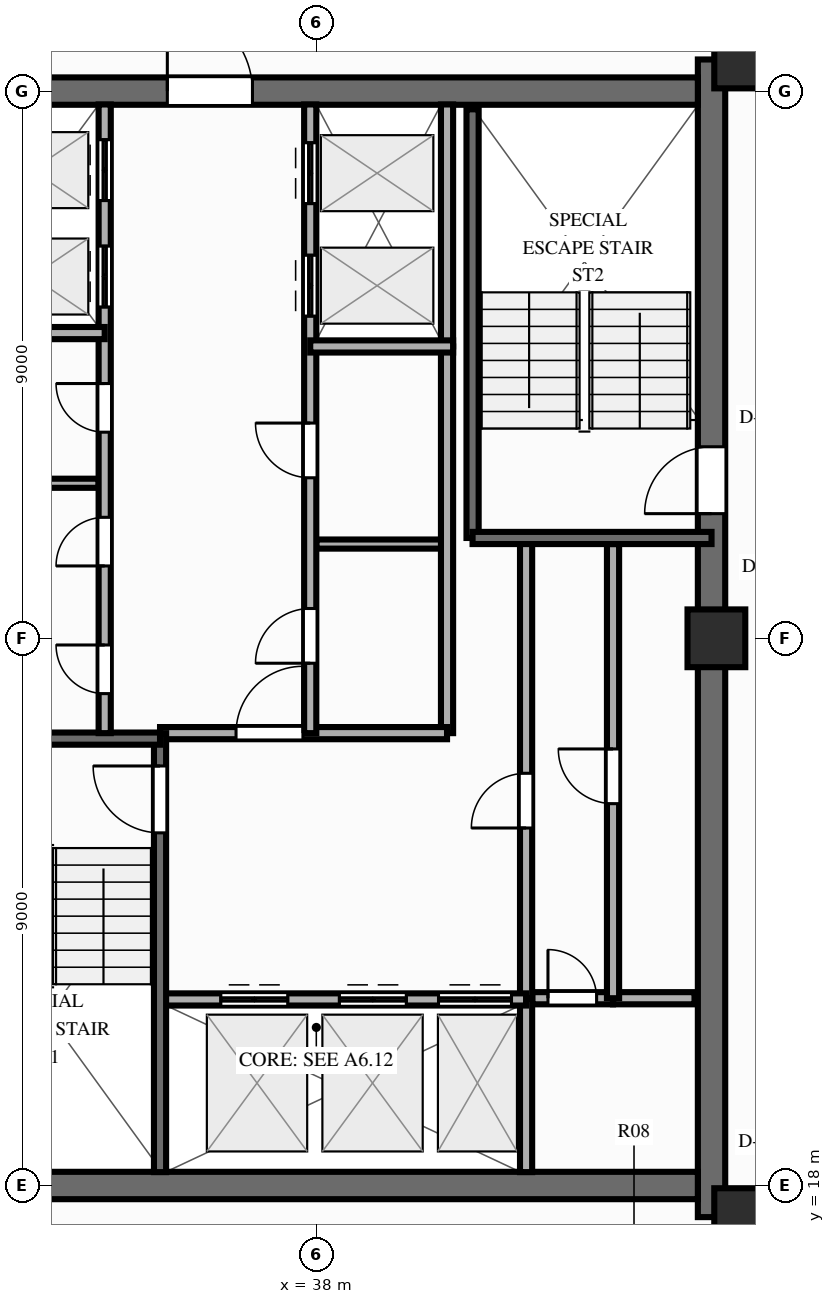
"""IFC4 building model, lengths in metres.
Left out: names, types, materials, properties, quantities, classifications, styles, units other than length and angle.
Written with IfcOpenShell. Run it as: python <this file> out.ifc"""

import sys

from ifc_helpers import new_model, si_unit, direction, frame, frame_2d, origin, origin_2d, place, context, subcontext, project, spatial, rectangle, extrude, source, transform, mapped, element, fill, save


model = new_model("IFC4")
c1 = context("Model", 3, precision=1e-05, world=origin(), true_north=direction((0.0, 1.0)))
c2 = subcontext(c1, "Body", "Model", "MODEL_VIEW")
j1 = project(units=[si_unit("LENGTHUNIT", "METRE"), si_unit("PLANEANGLEUNIT", "RADIAN")], contexts=[c1])
p1 = place(None, origin())
s1 = spatial("IfcSite", under=j1, at=p1, CompositionType="ELEMENT")
p2 = place(p1, origin())
s2 = spatial("IfcBuilding", under=s1, at=p2, CompositionType="ELEMENT")
p3 = place(p2, frame((0.0, 0.0, 246.0)))
s3 = spatial("IfcBuildingStorey", under=s2, at=p3, CompositionType="ELEMENT", Elevation=246.0)
p4 = place(p3, frame((44.5, 17.48, 0.0), z_axis=(0.0, 0.0, 1.0), x_axis=(0.0, 1.0, 0.0)))
e1 = element("IfcWall", 1, at=p4, inside=s3, PredefinedType="SHEAR", context=c2, shape_type="SweptSolid", body=[
    extrude(rectangle(XDim=19.04, YDim=0.45, at=frame_2d((9.52, 0.0))), origin(), (0.0, 0.0, 1.0), 3.0),
])
p5 = place(p4, frame((12.67, 0.0, 0.0), z_axis=(0.0, 0.0, 1.0), x_axis=(-1.0, 0.0, 0.0)))
e2 = element("IfcOpeningElement", 2, at=p5, cuts=e1, PredefinedType="OPENING", context=c2, shape_type="SweptSolid", body=[
    extrude(rectangle(XDim=1.1, YDim=2.15, at=frame_2d((0.55, 1.075))), frame((0.0, 0.237, 0.0), z_axis=(0.0, -1.0, 0.0), x_axis=(1.0, 0.0, 0.0)), (0.0, 0.0, 1.0), 0.474),
])
p6 = place(p3, frame((31.725, 18.0, 0.0), z_axis=(0.0, 0.0, 1.0), x_axis=(1.0, 0.0, 0.0)))
e3 = element("IfcWall", 3, at=p6, inside=s3, PredefinedType="SHEAR", context=c2, shape_type="SweptSolid", body=[
    extrude(rectangle(XDim=12.55, YDim=0.45, at=frame_2d((6.275, 0.0))), origin(), (0.0, 0.0, 1.0), 3.0),
])
p7 = place(p3, frame((31.725, 36.0, 0.0), z_axis=(0.0, 0.0, 1.0), x_axis=(1.0, 0.0, 0.0)))
e4 = element("IfcWall", 4, at=p7, inside=s3, PredefinedType="SHEAR", context=c2, shape_type="SweptSolid", body=[
    extrude(rectangle(XDim=12.55, YDim=0.45, at=frame_2d((6.275, 0.0))), origin(), (0.0, 0.0, 1.0), 3.0),
])
p8 = place(p7, frame((5.225, 0.0, 0.0), z_axis=(0.0, 0.0, 1.0), x_axis=(-1.0, 0.0, 0.0)))
e5 = element("IfcOpeningElement", 5, at=p8, cuts=e4, PredefinedType="OPENING", context=c2, shape_type="SweptSolid", body=[
    extrude(rectangle(XDim=1.4, YDim=2.15, at=frame_2d((0.7, 1.075))), frame((0.0, 0.237, 0.0), z_axis=(0.0, -1.0, 0.0), x_axis=(1.0, 0.0, 0.0)), (0.0, 0.0, 1.0), 0.474),
])
m1 = source(origin(), c2, "Body", "SweptSolid", [
    extrude(rectangle(XDim=0.95, YDim=0.95, at=origin_2d()), origin(), (0.0, 0.0, 1.0), 3.0),
])
for number, where, z_axis, x_axis in (
    (6, (45.02, 17.48, 0.0), (0.0, 0.0, 1.0), (1.0, 0.0, 0.0)),
    (7, (45.02, 36.52, 0.0), (0.0, 0.0, 1.0), (1.0, 0.0, 0.0)),
    (8, (44.58, 27.0, 0.0), (0.0, 0.0, 1.0), (1.0, 0.0, 0.0)),
):
    element("IfcColumn", number, at=place(p3, frame(where, z_axis=z_axis, x_axis=x_axis)), inside=s3, PredefinedType="COLUMN", context=c2, shape_type="MappedRepresentation", body=[
        mapped(m1, transform((0.0, 0.0, 0.0), scale=1.0)),
    ])
p9 = place(p3, frame((32.15, 29.55, 0.0), z_axis=(0.0, 0.0, 1.0), x_axis=(1.0, 0.0, 0.0)))
e9 = element("IfcWall", 9, at=p9, inside=s3, PredefinedType="PARTITIONING", context=c2, shape_type="SweptSolid", body=[
    extrude(rectangle(XDim=2.27, YDim=0.15, at=frame_2d((1.135, 0.0))), origin(), (0.0, 0.0, 1.0), 2.74),
])
p10 = place(p3, frame((38.0, 28.55, 0.0), z_axis=(0.0, 0.0, 1.0), x_axis=(1.0, 0.0, 0.0)))
e10 = element("IfcWall", 10, at=p10, inside=s3, PredefinedType="PARTITIONING", context=c2, shape_type="SweptSolid", body=[
    extrude(rectangle(XDim=2.2, YDim=0.15, at=frame_2d((1.1, 0.0))), origin(), (0.0, 0.0, 1.0), 2.14),
])
p11 = place(p3, frame((41.55, 21.08, 0.0), z_axis=(0.0, 0.0, 1.0), x_axis=(1.0, 0.0, 0.0)))
e11 = element("IfcWall", 11, at=p11, inside=s3, PredefinedType="PARTITIONING", context=c2, shape_type="SweptSolid", body=[
    extrude(rectangle(XDim=1.33, YDim=0.2, at=frame_2d((0.665, 0.0))), origin(), (0.0, 0.0, 1.0), 2.74),
])
p12 = place(p11, frame((0.26, 0.0, 0.0)))
e12 = element("IfcOpeningElement", 12, at=p12, cuts=e11, PredefinedType="OPENING", context=c2, shape_type="SweptSolid", body=[
    extrude(rectangle(XDim=0.8, YDim=2.05, at=frame_2d((0.4, 1.025))), frame((0.0, 0.112, 0.0), z_axis=(0.0, -1.0, 0.0), x_axis=(1.0, 0.0, 0.0)), (0.0, 0.0, 1.0), 0.224),
])
p13 = place(p3, frame((42.88, 21.08, 0.0), z_axis=(0.0, 0.0, 1.0), x_axis=(1.0, 0.0, 0.0)))
e13 = element("IfcWall", 13, at=p13, inside=s3, PredefinedType="PARTITIONING", context=c2, shape_type="SweptSolid", body=[
    extrude(rectangle(XDim=1.34, YDim=0.2, at=frame_2d((0.67, 0.0))), origin(), (0.0, 0.0, 1.0), 2.74),
])
p14 = place(p3, frame((42.88, 21.08, 0.0), z_axis=(0.0, 0.0, 1.0), x_axis=(0.0, 1.0, 0.0)))
e14 = element("IfcWall", 14, at=p14, inside=s3, PredefinedType="PARTITIONING", context=c2, shape_type="SweptSolid", body=[
    extrude(rectangle(XDim=7.47, YDim=0.2, at=frame_2d((3.735, 0.0))), origin(), (0.0, 0.0, 1.0), 2.74),
])
p15 = place(p14, frame((3.2, 0.0, 0.0)))
e15 = element("IfcOpeningElement", 15, at=p15, cuts=e14, PredefinedType="OPENING", context=c2, shape_type="SweptSolid", body=[
    extrude(rectangle(XDim=0.9, YDim=2.1, at=frame_2d((0.45, 1.05))), frame((0.0, 0.112, 0.0), z_axis=(0.0, -1.0, 0.0), x_axis=(1.0, 0.0, 0.0)), (0.0, 0.0, 1.0), 0.224),
])
p16 = place(p3, frame((41.45, 18.22, 0.0), z_axis=(0.0, 0.0, 1.0), x_axis=(0.0, 1.0, 0.0)))
e16 = element("IfcWall", 16, at=p16, inside=s3, PredefinedType="PARTITIONING", context=c2, shape_type="SweptSolid", body=[
    extrude(rectangle(XDim=2.86, YDim=0.2, at=frame_2d((1.43, 0.0))), origin(), (0.0, 0.0, 1.0), 2.74),
])
p17 = place(p3, frame((41.45, 21.08, 0.0), z_axis=(0.0, 0.0, 1.0), x_axis=(0.0, 1.0, 0.0)))
e17 = element("IfcWall", 17, at=p17, inside=s3, PredefinedType="PARTITIONING", context=c2, shape_type="SweptSolid", body=[
    extrude(rectangle(XDim=7.52, YDim=0.2, at=frame_2d((3.76, 0.0))), origin(), (0.0, 0.0, 1.0), 2.74),
])
p18 = place(p17, frame((2.8, 0.0, 0.0)))
e18 = element("IfcOpeningElement", 18, at=p18, cuts=e17, PredefinedType="OPENING", context=c2, shape_type="SweptSolid", body=[
    extrude(rectangle(XDim=0.9, YDim=2.1, at=frame_2d((0.45, 1.05))), frame((0.0, 0.112, 0.0), z_axis=(0.0, -1.0, 0.0), x_axis=(1.0, 0.0, 0.0)), (0.0, 0.0, 1.0), 0.224),
])
p19 = place(p3, frame((40.15, 25.44, 0.0), z_axis=(0.0, 0.0, 1.0), x_axis=(0.0, 1.0, 0.0)))
e19 = element("IfcWall", 19, at=p19, inside=s3, PredefinedType="PARTITIONING", context=c2, shape_type="SweptSolid", body=[
    extrude(rectangle(XDim=6.36, YDim=0.2, at=frame_2d((3.18, 0.0))), origin(), (0.0, 0.0, 1.0), 2.74),
])
p20 = place(p3, frame((40.15, 31.8, 0.0), z_axis=(0.0, 0.0, 1.0), x_axis=(0.0, 1.0, 0.0)))
e20 = element("IfcWall", 20, at=p20, inside=s3, PredefinedType="PARTITIONING", context=c2, shape_type="SweptSolid", body=[
    extrude(rectangle(XDim=3.98, YDim=0.2, at=frame_2d((1.99, 0.0))), origin(), (0.0, 0.0, 1.0), 2.74),
])
p21 = place(p3, frame((35.43, 21.06, 0.0), z_axis=(0.0, 0.0, 1.0), x_axis=(1.0, 0.0, 0.0)))
e21 = element("IfcWall", 21, at=p21, inside=s3, PredefinedType="PARTITIONING", context=c2, shape_type="SweptSolid", body=[
    extrude(rectangle(XDim=6.02, YDim=0.2, at=frame_2d((3.01, 0.0))), origin(), (0.0, 0.0, 1.0), 2.74),
])
p22 = place(p21, frame((1.0, 0.0, 0.0)))
e22 = element("IfcOpeningElement", 22, at=p22, cuts=e21, PredefinedType="OPENING", context=c2, shape_type="SweptSolid", body=[
    extrude(rectangle(XDim=1.1, YDim=2.15, at=frame_2d((0.55, 1.075))), frame((0.0, 0.112, 0.0), z_axis=(0.0, -1.0, 0.0), x_axis=(1.0, 0.0, 0.0)), (0.0, 0.0, 1.0), 0.224),
])
p23 = place(p21, frame((2.95, 0.0, 0.0)))
e23 = element("IfcOpeningElement", 23, at=p23, cuts=e21, PredefinedType="OPENING", context=c2, shape_type="SweptSolid", body=[
    extrude(rectangle(XDim=1.1, YDim=2.15, at=frame_2d((0.55, 1.075))), frame((0.0, 0.112, 0.0), z_axis=(0.0, -1.0, 0.0), x_axis=(1.0, 0.0, 0.0)), (0.0, 0.0, 1.0), 0.224),
])
p24 = place(p21, frame((4.58, 0.0, 0.0)))
e24 = element("IfcOpeningElement", 24, at=p24, cuts=e21, PredefinedType="OPENING", context=c2, shape_type="SweptSolid", body=[
    extrude(rectangle(XDim=1.2, YDim=2.15, at=frame_2d((0.6, 1.075))), frame((0.0, 0.112, 0.0), z_axis=(0.0, -1.0, 0.0), x_axis=(1.0, 0.0, 0.0)), (0.0, 0.0, 1.0), 0.224),
])
p25 = place(p3, frame((35.43, 25.44, 0.0), z_axis=(0.0, 0.0, 1.0), x_axis=(1.0, 0.0, 0.0)))
e25 = element("IfcWall", 25, at=p25, inside=s3, PredefinedType="PARTITIONING", context=c2, shape_type="SweptSolid", body=[
    extrude(rectangle(XDim=4.72, YDim=0.2, at=frame_2d((2.36, 0.0))), origin(), (0.0, 0.0, 1.0), 2.74),
])
p26 = place(p25, frame((1.25, 0.0, 0.0)))
e26 = element("IfcOpeningElement", 26, at=p26, cuts=e25, PredefinedType="OPENING", context=c2, shape_type="SweptSolid", body=[
    extrude(rectangle(XDim=1.1, YDim=2.15, at=frame_2d((0.55, 1.075))), frame((0.0, 0.112, 0.0), z_axis=(0.0, -1.0, 0.0), x_axis=(1.0, 0.0, 0.0)), (0.0, 0.0, 1.0), 0.224),
])
p27 = place(p3, frame((35.43, 18.22, 0.0), z_axis=(0.0, 0.0, 1.0), x_axis=(0.0, 1.0, 0.0)))
e27 = element("IfcWall", 27, at=p27, inside=s3, PredefinedType="SOLIDWALL", context=c2, shape_type="SweptSolid", body=[
    extrude(rectangle(XDim=7.22, YDim=0.2, at=frame_2d((3.61, 0.0))), origin(), (0.0, 0.0, 1.0), 2.74),
])
p28 = place(p27, frame((6.68, 0.0, 0.0), z_axis=(0.0, 0.0, 1.0), x_axis=(-1.0, 0.0, 0.0)))
e28 = element("IfcOpeningElement", 28, at=p28, cuts=e27, PredefinedType="OPENING", context=c2, shape_type="SweptSolid", body=[
    extrude(rectangle(XDim=1.1, YDim=2.15, at=frame_2d((0.55, 1.075))), frame((0.0, 0.112, 0.0), z_axis=(0.0, -1.0, 0.0), x_axis=(1.0, 0.0, 0.0)), (0.0, 0.0, 1.0), 0.224),
])
p29 = place(p3, frame((31.5, 25.35, 0.0), z_axis=(0.0, 0.0, 1.0), x_axis=(1.0, 0.0, 0.0)))
e29 = element("IfcWall", 29, at=p29, inside=s3, PredefinedType="SOLIDWALL", context=c2, shape_type="SweptSolid", body=[
    extrude(rectangle(XDim=3.93, YDim=0.2, at=frame_2d((1.965, 0.0))), origin(), (0.0, 0.0, 1.0), 2.74),
])
p30 = place(p3, frame((40.57, 28.65, 0.0), z_axis=(0.0, 0.0, 1.0), x_axis=(0.0, 1.0, 0.0)))
e30 = element("IfcWall", 30, at=p30, inside=s3, PredefinedType="SOLIDWALL", context=c2, shape_type="SweptSolid", body=[
    extrude(rectangle(XDim=7.05, YDim=0.2, at=frame_2d((3.525, 0.0))), origin(), (0.0, 0.0, 1.0), 2.74),
])
p31 = place(p3, frame((40.57, 28.65, 0.0), z_axis=(0.0, 0.0, 1.0), x_axis=(1.0, 0.0, 0.0)))
e31 = element("IfcWall", 31, at=p31, inside=s3, PredefinedType="SOLIDWALL", context=c2, shape_type="SweptSolid", body=[
    extrude(rectangle(XDim=3.93, YDim=0.2, at=frame_2d((1.965, 0.0))), origin(), (0.0, 0.0, 1.0), 2.74),
])
p32 = place(p3, frame((34.52, 25.44, 0.0), z_axis=(0.0, 0.0, 1.0), x_axis=(0.0, 1.0, 0.0)))
e32 = element("IfcWall", 32, at=p32, inside=s3, PredefinedType="PARTITIONING", context=c2, shape_type="SweptSolid", body=[
    extrude(rectangle(XDim=10.34, YDim=0.2, at=frame_2d((5.17, 0.0))), origin(), (0.0, 0.0, 1.0), 2.74),
])
p33 = place(p32, frame((0.65, 0.0, 0.0)))
e33 = element("IfcOpeningElement", 33, at=p33, cuts=e32, PredefinedType="OPENING", context=c2, shape_type="SweptSolid", body=[
    extrude(rectangle(XDim=0.8, YDim=2.05, at=frame_2d((0.4, 1.025))), frame((0.0, 0.112, 0.0), z_axis=(0.0, -1.0, 0.0), x_axis=(1.0, 0.0, 0.0)), (0.0, 0.0, 1.0), 0.224),
])
p34 = place(p32, frame((2.75, 0.0, 0.0)))
e34 = element("IfcOpeningElement", 34, at=p34, cuts=e32, PredefinedType="OPENING", context=c2, shape_type="SweptSolid", body=[
    extrude(rectangle(XDim=0.8, YDim=2.05, at=frame_2d((0.4, 1.025))), frame((0.0, 0.112, 0.0), z_axis=(0.0, -1.0, 0.0), x_axis=(1.0, 0.0, 0.0)), (0.0, 0.0, 1.0), 0.224),
])
p35 = place(p32, frame((4.95, 0.0, 0.0)))
e35 = element("IfcOpeningElement", 35, at=p35, cuts=e32, PredefinedType="OPENING", context=c2, shape_type="SweptSolid", body=[
    extrude(rectangle(XDim=0.8, YDim=2.05, at=frame_2d((0.4, 1.025))), frame((0.0, 0.112, 0.0), z_axis=(0.0, -1.0, 0.0), x_axis=(1.0, 0.0, 0.0)), (0.0, 0.0, 1.0), 0.224),
])
p36 = place(p32, frame((7.01, 0.0, 0.0)))
e36 = element("IfcOpeningElement", 36, at=p36, cuts=e32, PredefinedType="OPENING", context=c2, shape_type="SweptSolid", body=[
    extrude(rectangle(XDim=1.0, YDim=2.15, at=frame_2d((0.5, 1.075))), frame((0.0, 0.112, 0.0), z_axis=(0.0, -1.0, 0.0), x_axis=(1.0, 0.0, 0.0)), (0.0, 0.0, 1.0), 0.224),
])
p37 = place(p32, frame((8.76, 0.0, 0.0)))
e37 = element("IfcOpeningElement", 37, at=p37, cuts=e32, PredefinedType="OPENING", context=c2, shape_type="SweptSolid", body=[
    extrude(rectangle(XDim=1.0, YDim=2.15, at=frame_2d((0.5, 1.075))), frame((0.0, 0.112, 0.0), z_axis=(0.0, -1.0, 0.0), x_axis=(1.0, 0.0, 0.0)), (0.0, 0.0, 1.0), 0.224),
])
p38 = place(p3, frame((31.72, 32.02, 0.0), z_axis=(0.0, 0.0, 1.0), x_axis=(1.0, 0.0, 0.0)))
e38 = element("IfcWall", 38, at=p38, inside=s3, PredefinedType="PARTITIONING", context=c2, shape_type="SweptSolid", body=[
    extrude(rectangle(XDim=2.8, YDim=0.2, at=frame_2d((1.4, 0.0))), origin(), (0.0, 0.0, 1.0), 2.74),
])
p39 = place(p3, frame((37.9, 25.44, 0.0), z_axis=(0.0, 0.0, 1.0), x_axis=(0.0, 1.0, 0.0)))
e39 = element("IfcWall", 39, at=p39, inside=s3, PredefinedType="PARTITIONING", context=c2, shape_type="SweptSolid", body=[
    extrude(rectangle(XDim=10.34, YDim=0.2, at=frame_2d((5.17, 0.0))), origin(), (0.0, 0.0, 1.0), 2.74),
])
p40 = place(p39, frame((1.15, 0.0, 0.0)))
e40 = element("IfcOpeningElement", 40, at=p40, cuts=e39, PredefinedType="OPENING", context=c2, shape_type="SweptSolid", body=[
    extrude(rectangle(XDim=0.9, YDim=2.1, at=frame_2d((0.45, 1.05))), frame((0.0, 0.112, 0.0), z_axis=(0.0, -1.0, 0.0), x_axis=(1.0, 0.0, 0.0)), (0.0, 0.0, 1.0), 0.224),
])
p41 = place(p39, frame((4.2, 0.0, 0.0)))
e41 = element("IfcOpeningElement", 41, at=p41, cuts=e39, PredefinedType="OPENING", context=c2, shape_type="SweptSolid", body=[
    extrude(rectangle(XDim=0.9, YDim=2.1, at=frame_2d((0.45, 1.05))), frame((0.0, 0.112, 0.0), z_axis=(0.0, -1.0, 0.0), x_axis=(1.0, 0.0, 0.0)), (0.0, 0.0, 1.0), 0.224),
])
p42 = place(p39, frame((6.86, 0.0, 0.0)))
e42 = element("IfcOpeningElement", 42, at=p42, cuts=e39, PredefinedType="OPENING", context=c2, shape_type="SweptSolid", body=[
    extrude(rectangle(XDim=1.0, YDim=2.15, at=frame_2d((0.5, 1.075))), frame((0.0, 0.112, 0.0), z_axis=(0.0, -1.0, 0.0), x_axis=(1.0, 0.0, 0.0)), (0.0, 0.0, 1.0), 0.224),
])
p43 = place(p39, frame((8.71, 0.0, 0.0)))
e43 = element("IfcOpeningElement", 43, at=p43, cuts=e39, PredefinedType="OPENING", context=c2, shape_type="SweptSolid", body=[
    extrude(rectangle(XDim=1.0, YDim=2.15, at=frame_2d((0.5, 1.075))), frame((0.0, 0.112, 0.0), z_axis=(0.0, -1.0, 0.0), x_axis=(1.0, 0.0, 0.0)), (0.0, 0.0, 1.0), 0.224),
])
p44 = place(p3, frame((37.9, 31.8, 0.0), z_axis=(0.0, 0.0, 1.0), x_axis=(1.0, 0.0, 0.0)))
e44 = element("IfcWall", 44, at=p44, inside=s3, PredefinedType="PARTITIONING", context=c2, shape_type="SweptSolid", body=[
    extrude(rectangle(XDim=2.35, YDim=0.2, at=frame_2d((1.175, 0.0))), origin(), (0.0, 0.0, 1.0), 2.74),
])
m2 = source(origin(), c2, "Body", "SweptSolid", [
    extrude(rectangle(XDim=1.1, YDim=2.15, at=frame_2d((0.55, 1.075))), frame((0.0, 0.025, 0.0), z_axis=(0.0, -1.0, 0.0), x_axis=(1.0, 0.0, 0.0)), (0.0, 0.0, 1.0), 0.05),
])
p45 = place(p5, origin())
e45 = element("IfcDoor", 45, at=p45, inside=s3, OperationType="SINGLE_SWING_RIGHT", PredefinedType="DOOR", context=c2, shape_type="MappedRepresentation", body=[
    mapped(m2, transform((0.0, 0.0, 0.0), scale=1.0)),
])
fill(e2, e45)
m3 = source(origin(), c2, "Body", "SweptSolid", [
    extrude(rectangle(XDim=1.4, YDim=2.15, at=frame_2d((0.7, 1.075))), frame((0.0, 0.025, 0.0), z_axis=(0.0, -1.0, 0.0), x_axis=(1.0, 0.0, 0.0)), (0.0, 0.0, 1.0), 0.05),
])
p46 = place(p8, origin())
e46 = element("IfcDoor", 46, at=p46, inside=s3, OperationType="SINGLE_SWING_RIGHT", PredefinedType="DOOR", context=c2, shape_type="MappedRepresentation", body=[
    mapped(m3, transform((0.0, 0.0, 0.0), scale=1.0)),
])
fill(e5, e46)
m4 = source(origin(), c2, "Body", "SweptSolid", [
    extrude(rectangle(XDim=0.8, YDim=2.05, at=frame_2d((0.4, 1.025))), frame((0.0, 0.025, 0.0), z_axis=(0.0, -1.0, 0.0), x_axis=(1.0, 0.0, 0.0)), (0.0, 0.0, 1.0), 0.05),
])
p47 = place(p12, origin())
e47 = element("IfcDoor", 47, at=p47, inside=s3, OperationType="SINGLE_SWING_LEFT", PredefinedType="DOOR", context=c2, shape_type="MappedRepresentation", body=[
    mapped(m4, transform((0.0, 0.0, 0.0), scale=1.0)),
])
fill(e12, e47)
m5 = source(origin(), c2, "Body", "SweptSolid", [
    extrude(rectangle(XDim=0.9, YDim=2.1, at=frame_2d((0.45, 1.05))), frame((0.0, 0.025, 0.0), z_axis=(0.0, -1.0, 0.0), x_axis=(1.0, 0.0, 0.0)), (0.0, 0.0, 1.0), 0.05),
])
p48 = place(p15, origin())
e48 = element("IfcDoor", 48, at=p48, inside=s3, OperationType="SINGLE_SWING_RIGHT", PredefinedType="DOOR", context=c2, shape_type="MappedRepresentation", body=[
    mapped(m5, transform((0.0, 0.0, 0.0), scale=1.0)),
])
fill(e15, e48)
p49 = place(p18, origin())
e49 = element("IfcDoor", 49, at=p49, inside=s3, OperationType="SINGLE_SWING_LEFT", PredefinedType="DOOR", context=c2, shape_type="MappedRepresentation", body=[
    mapped(m5, transform((0.0, 0.0, 0.0), scale=1.0)),
])
fill(e18, e49)
p50 = place(p22, origin())
e50 = element("IfcDoor", 50, at=p50, inside=s3, OperationType="DOUBLE_DOOR_SLIDING", PredefinedType="DOOR", context=c2, shape_type="MappedRepresentation", body=[
    mapped(m2, transform((0.0, 0.0, 0.0), scale=1.0)),
])
fill(e22, e50)
p51 = place(p23, origin())
e51 = element("IfcDoor", 51, at=p51, inside=s3, OperationType="DOUBLE_DOOR_SLIDING", PredefinedType="DOOR", context=c2, shape_type="MappedRepresentation", body=[
    mapped(m2, transform((0.0, 0.0, 0.0), scale=1.0)),
])
fill(e23, e51)
m6 = source(origin(), c2, "Body", "SweptSolid", [
    extrude(rectangle(XDim=1.2, YDim=2.15, at=frame_2d((0.6, 1.075))), frame((0.0, 0.025, 0.0), z_axis=(0.0, -1.0, 0.0), x_axis=(1.0, 0.0, 0.0)), (0.0, 0.0, 1.0), 0.05),
])
p52 = place(p24, origin())
e52 = element("IfcDoor", 52, at=p52, inside=s3, OperationType="DOUBLE_DOOR_SLIDING", PredefinedType="DOOR", context=c2, shape_type="MappedRepresentation", body=[
    mapped(m6, transform((0.0, 0.0, 0.0), scale=1.0)),
])
fill(e24, e52)
p53 = place(p26, origin())
e53 = element("IfcDoor", 53, at=p53, inside=s3, OperationType="SINGLE_SWING_RIGHT", PredefinedType="DOOR", context=c2, shape_type="MappedRepresentation", body=[
    mapped(m2, transform((0.0, 0.0, 0.0), scale=1.0)),
])
fill(e26, e53)
p54 = place(p28, origin())
e54 = element("IfcDoor", 54, at=p54, inside=s3, OperationType="SINGLE_SWING_LEFT", PredefinedType="DOOR", context=c2, shape_type="MappedRepresentation", body=[
    mapped(m2, transform((0.0, 0.0, 0.0), scale=1.0)),
])
fill(e28, e54)
p55 = place(p33, origin())
e55 = element("IfcDoor", 55, at=p55, inside=s3, OperationType="SINGLE_SWING_RIGHT", PredefinedType="DOOR", context=c2, shape_type="MappedRepresentation", body=[
    mapped(m4, transform((0.0, 0.0, 0.0), scale=1.0)),
])
fill(e33, e55)
p56 = place(p34, origin())
e56 = element("IfcDoor", 56, at=p56, inside=s3, OperationType="SINGLE_SWING_LEFT", PredefinedType="DOOR", context=c2, shape_type="MappedRepresentation", body=[
    mapped(m4, transform((0.0, 0.0, 0.0), scale=1.0)),
])
fill(e34, e56)
p57 = place(p35, origin())
e57 = element("IfcDoor", 57, at=p57, inside=s3, OperationType="SINGLE_SWING_RIGHT", PredefinedType="DOOR", context=c2, shape_type="MappedRepresentation", body=[
    mapped(m4, transform((0.0, 0.0, 0.0), scale=1.0)),
])
fill(e35, e57)
m7 = source(origin(), c2, "Body", "SweptSolid", [
    extrude(rectangle(XDim=1.0, YDim=2.15, at=frame_2d((0.5, 1.075))), frame((0.0, 0.025, 0.0), z_axis=(0.0, -1.0, 0.0), x_axis=(1.0, 0.0, 0.0)), (0.0, 0.0, 1.0), 0.05),
])
p58 = place(p36, origin())
e58 = element("IfcDoor", 58, at=p58, inside=s3, OperationType="DOUBLE_DOOR_SLIDING", PredefinedType="DOOR", context=c2, shape_type="MappedRepresentation", body=[
    mapped(m7, transform((0.0, 0.0, 0.0), scale=1.0)),
])
fill(e36, e58)
p59 = place(p37, origin())
e59 = element("IfcDoor", 59, at=p59, inside=s3, OperationType="DOUBLE_DOOR_SLIDING", PredefinedType="DOOR", context=c2, shape_type="MappedRepresentation", body=[
    mapped(m7, transform((0.0, 0.0, 0.0), scale=1.0)),
])
fill(e37, e59)
p60 = place(p40, origin())
e60 = element("IfcDoor", 60, at=p60, inside=s3, OperationType="SINGLE_SWING_LEFT", PredefinedType="DOOR", context=c2, shape_type="MappedRepresentation", body=[
    mapped(m5, transform((0.0, 0.0, 0.0), scale=1.0)),
])
fill(e40, e60)
p61 = place(p41, origin())
e61 = element("IfcDoor", 61, at=p61, inside=s3, OperationType="SINGLE_SWING_RIGHT", PredefinedType="DOOR", context=c2, shape_type="MappedRepresentation", body=[
    mapped(m5, transform((0.0, 0.0, 0.0), scale=1.0)),
])
fill(e41, e61)
p62 = place(p42, origin())
e62 = element("IfcDoor", 62, at=p62, inside=s3, OperationType="DOUBLE_DOOR_SLIDING", PredefinedType="DOOR", context=c2, shape_type="MappedRepresentation", body=[
    mapped(m7, transform((0.0, 0.0, 0.0), scale=1.0)),
])
fill(e42, e62)
p63 = place(p43, origin())
e63 = element("IfcDoor", 63, at=p63, inside=s3, OperationType="DOUBLE_DOOR_SLIDING", PredefinedType="DOOR", context=c2, shape_type="MappedRepresentation", body=[
    mapped(m7, transform((0.0, 0.0, 0.0), scale=1.0)),
])
fill(e43, e63)
save(model, sys.argv[1])
